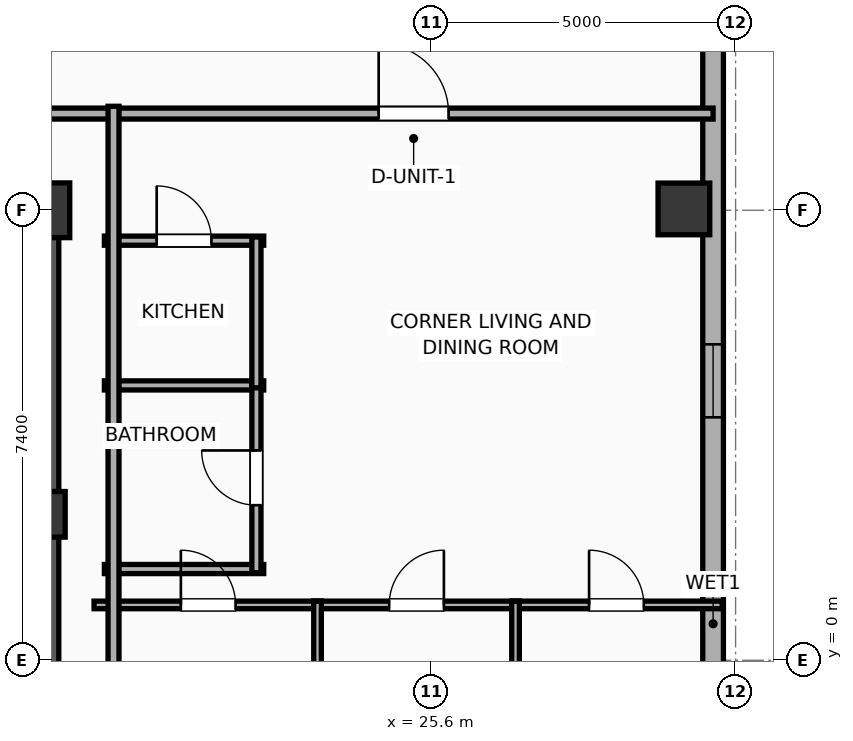
"""IFC4 building model, lengths in metres.
Left out: names, types, materials, properties, quantities, classifications, styles, units other than length and angle.
Written with IfcOpenShell. Run it as: python <this file> out.ifc"""

import sys

from ifc_helpers import new_model, si_unit, direction, frame, frame_2d, origin, origin_2d, place, context, subcontext, project, spatial, rectangle, hollow_rectangle, extrude, element, fill, save


model = new_model("IFC4")
c1 = context("Model", 3, precision=1e-05, world=origin(), true_north=direction((0.0, 1.0)))
c2 = subcontext(c1, "Body", "Model", "MODEL_VIEW")
j1 = project(units=[si_unit("LENGTHUNIT", "METRE"), si_unit("PLANEANGLEUNIT", "RADIAN")], contexts=[c1])
p1 = place(None, origin())
s1 = spatial("IfcSite", under=j1, at=p1, CompositionType="ELEMENT")
p2 = place(p1, origin())
s2 = spatial("IfcBuilding", under=s1, at=p2, CompositionType="ELEMENT")
p3 = place(p2, frame((0.0, 0.0, 247.0)))
s3 = spatial("IfcBuildingStorey", under=s2, at=p3, CompositionType="ELEMENT", Elevation=247.0)
p4 = place(p3, frame((19.2, 2.4, 0.0), z_axis=(0.0, 0.0, 1.0), x_axis=(1.0, 0.0, 0.0)))
e1 = element("IfcColumn", 1, at=p4, inside=s3, PredefinedType="COLUMN", context=c2, shape_type="SweptSolid", body=[
    extrude(rectangle(XDim=0.75, YDim=0.75, at=origin_2d()), origin(), (0.0, 0.0, 1.0), 3.9),
])
p5 = place(p3, frame((19.2, 7.4, 0.0), z_axis=(0.0, 0.0, 1.0), x_axis=(1.0, 0.0, 0.0)))
e2 = element("IfcColumn", 2, at=p5, inside=s3, PredefinedType="COLUMN", context=c2, shape_type="SweptSolid", body=[
    extrude(rectangle(XDim=0.9, YDim=0.9, at=origin_2d()), origin(), (0.0, 0.0, 1.0), 3.9),
])
p6 = place(p3, frame((12.175, 7.4, 0.0), z_axis=(0.0, 0.0, 1.0), x_axis=(1.0, 0.0, 0.0)))
e3 = element("IfcWall", 3, at=p6, inside=s3, PredefinedType="SHEAR", context=c2, shape_type="SweptSolid", body=[
    extrude(rectangle(XDim=7.25, YDim=0.45, at=frame_2d((3.625, 0.0))), origin(), (0.0, 0.0, 1.0), 3.65),
])
p7 = place(p3, frame((19.145, -7.4, 0.0), z_axis=(0.0, 0.0, 1.0), x_axis=(0.0, 1.0, 0.0)))
e4 = element("IfcWall", 4, at=p7, inside=s3, PredefinedType="SHEAR", context=c2, shape_type="SweptSolid", body=[
    extrude(rectangle(XDim=14.8, YDim=0.65, at=frame_2d((7.4, 0.0))), origin(), (0.0, 0.0, 1.0), 3.65),
])
p8 = place(p3, frame((29.75, 7.422, 0.0), z_axis=(0.0, 0.0, 1.0), x_axis=(1.0, 0.0, 0.0)))
e5 = element("IfcColumn", 5, at=p8, inside=s3, PredefinedType="COLUMN", context=c2, shape_type="SweptSolid", body=[
    extrude(hollow_rectangle(XDim=0.85, YDim=0.85, WallThickness=0.028, at=origin_2d()), origin(), (0.0, 0.0, 1.0), 3.9),
])
p9 = place(p3, frame((30.23, 16.583, 0.0), z_axis=(0.0, 0.0, 1.0), x_axis=(0.0, -1.0, 0.0)))
e6 = element("IfcWall", 6, at=p9, inside=s3, PredefinedType="ELEMENTEDWALL", context=c2, shape_type="SweptSolid", body=[
    extrude(rectangle(XDim=31.967, YDim=0.34, at=frame_2d((15.983, 0.0))), origin(), (0.0, 0.0, 1.0), 3.65),
])
p10 = place(p9, frame((11.388, 0.0, 0.75)))
e7 = element("IfcOpeningElement", 7, at=p10, cuts=e6, PredefinedType="OPENING", context=c2, shape_type="SweptSolid", body=[
    extrude(rectangle(XDim=1.2, YDim=2.05, at=frame_2d((0.6, 1.025))), frame((0.0, 0.18, 0.0), z_axis=(0.0, -1.0, 0.0), x_axis=(1.0, 0.0, 0.0)), (0.0, 0.0, 1.0), 0.36),
])
p11 = place(p9, frame((20.438, 0.0, 0.75)))
e8 = element("IfcOpeningElement", 8, at=p11, cuts=e6, PredefinedType="OPENING", context=c2, shape_type="SweptSolid", body=[
    extrude(rectangle(XDim=1.2, YDim=2.05, at=frame_2d((0.6, 1.025))), frame((0.0, 0.18, 0.0), z_axis=(0.0, -1.0, 0.0), x_axis=(1.0, 0.0, 0.0)), (0.0, 0.0, 1.0), 0.36),
])
p12 = place(p3, frame((9.88, 8.99, 0.0), z_axis=(0.0, 0.0, 1.0), x_axis=(1.0, 0.0, 0.0)))
e9 = element("IfcWall", 9, at=p12, inside=s3, PredefinedType="PARTITIONING", context=c2, shape_type="SweptSolid", body=[
    extrude(rectangle(XDim=20.35, YDim=0.18, at=frame_2d((10.175, 0.0))), origin(), (0.0, 0.0, 1.0), 3.65),
])
p13 = place(p12, frame((14.85, 0.0, 0.0)))
e10 = element("IfcOpeningElement", 10, at=p13, cuts=e9, PredefinedType="OPENING", context=c2, shape_type="SweptSolid", body=[
    extrude(rectangle(XDim=1.15, YDim=2.05, at=frame_2d((0.575, 1.025))), frame((0.0, 0.1, 0.0), z_axis=(0.0, -1.0, 0.0), x_axis=(1.0, 0.0, 0.0)), (0.0, 0.0, 1.0), 0.2),
])
p14 = place(p3, frame((20.22, 6.9, 0.0), z_axis=(0.0, 0.0, 1.0), x_axis=(1.0, 0.0, 0.0)))
e11 = element("IfcWall", 11, at=p14, inside=s3, PredefinedType="PLUMBINGWALL", context=c2, shape_type="SweptSolid", body=[
    extrude(rectangle(XDim=2.62, YDim=0.15, at=frame_2d((1.31, 0.0))), origin(), (0.0, 0.0, 1.0), 3.65),
])
p15 = place(p14, frame((0.86, 0.0, 0.0)))
e12 = element("IfcOpeningElement", 12, at=p15, cuts=e11, PredefinedType="OPENING", context=c2, shape_type="SweptSolid", body=[
    extrude(rectangle(XDim=0.9, YDim=2.05, at=frame_2d((0.45, 1.025))), frame((0.0, 0.085, 0.0), z_axis=(0.0, -1.0, 0.0), x_axis=(1.0, 0.0, 0.0)), (0.0, 0.0, 1.0), 0.17),
])
for number, where, z_axis, x_axis in (
    (13, (20.22, 4.52, 0.0), (0.0, 0.0, 1.0), (1.0, 0.0, 0.0)),
    (14, (20.22, 1.5, 0.0), (0.0, 0.0, 1.0), (1.0, 0.0, 0.0)),
):
    element("IfcWall", number, at=place(p3, frame(where, z_axis=z_axis, x_axis=x_axis)), inside=s3, PredefinedType="PLUMBINGWALL", context=c2, shape_type="SweptSolid", body=[
        extrude(rectangle(XDim=2.62, YDim=0.15, at=frame_2d((1.31, 0.0))), origin(), (0.0, 0.0, 1.0), 3.65),
    ])
p16 = place(p3, frame((22.72, 1.44, 0.0), z_axis=(0.0, 0.0, 1.0), x_axis=(0.0, 1.0, 0.0)))
e15 = element("IfcWall", 15, at=p16, inside=s3, PredefinedType="PLUMBINGWALL", context=c2, shape_type="SweptSolid", body=[
    extrude(rectangle(XDim=3.12, YDim=0.15, at=frame_2d((1.56, 0.0))), origin(), (0.0, 0.0, 1.0), 3.65),
])
p17 = place(p16, frame((1.11, 0.0, 0.0)))
e16 = element("IfcOpeningElement", 16, at=p17, cuts=e15, PredefinedType="OPENING", context=c2, shape_type="SweptSolid", body=[
    extrude(rectangle(XDim=0.9, YDim=2.05, at=frame_2d((0.45, 1.025))), frame((0.0, 0.085, 0.0), z_axis=(0.0, -1.0, 0.0), x_axis=(1.0, 0.0, 0.0)), (0.0, 0.0, 1.0), 0.17),
])
p18 = place(p3, frame((22.72, 4.48, 0.0), z_axis=(0.0, 0.0, 1.0), x_axis=(0.0, 1.0, 0.0)))
e17 = element("IfcWall", 17, at=p18, inside=s3, PredefinedType="PLUMBINGWALL", context=c2, shape_type="SweptSolid", body=[
    extrude(rectangle(XDim=2.48, YDim=0.15, at=frame_2d((1.24, 0.0))), origin(), (0.0, 0.0, 1.0), 3.65),
])
p19 = place(p3, frame((20.05, 0.91, 0.0), z_axis=(0.0, 0.0, 1.0), x_axis=(1.0, 0.0, 0.0)))
e18 = element("IfcWall", 18, at=p19, inside=s3, PredefinedType="PARTITIONING", context=c2, shape_type="SweptSolid", body=[
    extrude(rectangle(XDim=3.738, YDim=0.125, at=frame_2d((1.869, 0.0))), origin(), (0.0, 0.0, 1.0), 3.65),
])
p20 = place(p19, frame((1.427, 0.0, 0.0)))
e19 = element("IfcOpeningElement", 19, at=p20, cuts=e18, PredefinedType="OPENING", context=c2, shape_type="SweptSolid", body=[
    extrude(rectangle(XDim=0.9, YDim=2.05, at=frame_2d((0.45, 1.025))), frame((0.0, 0.073, 0.0), z_axis=(0.0, -1.0, 0.0), x_axis=(1.0, 0.0, 0.0)), (0.0, 0.0, 1.0), 0.145),
])
p21 = place(p3, frame((23.663, 0.91, 0.0), z_axis=(0.0, 0.0, 1.0), x_axis=(1.0, 0.0, 0.0)))
e20 = element("IfcWall", 20, at=p21, inside=s3, PredefinedType="PARTITIONING", context=c2, shape_type="SweptSolid", body=[
    extrude(rectangle(XDim=3.381, YDim=0.125, at=frame_2d((1.69, 0.0))), origin(), (0.0, 0.0, 1.0), 3.65),
])
p22 = place(p21, frame((1.24, 0.0, 0.0)))
e21 = element("IfcOpeningElement", 21, at=p22, cuts=e20, PredefinedType="OPENING", context=c2, shape_type="SweptSolid", body=[
    extrude(rectangle(XDim=0.9, YDim=2.05, at=frame_2d((0.45, 1.025))), frame((0.0, 0.073, 0.0), z_axis=(0.0, -1.0, 0.0), x_axis=(1.0, 0.0, 0.0)), (0.0, 0.0, 1.0), 0.145),
])
p23 = place(p3, frame((26.918, 0.91, 0.0), z_axis=(0.0, 0.0, 1.0), x_axis=(1.0, 0.0, 0.0)))
e22 = element("IfcWall", 22, at=p23, inside=s3, PredefinedType="PARTITIONING", context=c2, shape_type="SweptSolid", body=[
    extrude(rectangle(XDim=3.461, YDim=0.125, at=frame_2d((1.731, 0.0))), origin(), (0.0, 0.0, 1.0), 3.65),
])
p24 = place(p23, frame((1.272, 0.0, 0.0)))
e23 = element("IfcOpeningElement", 23, at=p24, cuts=e22, PredefinedType="OPENING", context=c2, shape_type="SweptSolid", body=[
    extrude(rectangle(XDim=0.9, YDim=2.05, at=frame_2d((0.45, 1.025))), frame((0.0, 0.073, 0.0), z_axis=(0.0, -1.0, 0.0), x_axis=(1.0, 0.0, 0.0)), (0.0, 0.0, 1.0), 0.145),
])
for number, where, z_axis, x_axis in (
    (24, (26.981, -9.31, 0.0), (0.0, 0.0, 1.0), (0.0, 1.0, 0.0)),
    (25, (23.725, -9.31, 0.0), (0.0, 0.0, 1.0), (0.0, 1.0, 0.0)),
):
    element("IfcWall", number, at=place(p3, frame(where, z_axis=z_axis, x_axis=x_axis)), inside=s3, PredefinedType="PARTITIONING", context=c2, shape_type="SweptSolid", body=[
        extrude(rectangle(XDim=10.28, YDim=0.125, at=frame_2d((5.14, 0.0))), origin(), (0.0, 0.0, 1.0), 3.65),
    ])
p25 = place(p3, frame((20.37, -9.11, 0.0), z_axis=(0.0, 0.0, 1.0), x_axis=(0.0, 1.0, 0.0)))
e26 = element("IfcWall", 26, at=p25, inside=s3, PredefinedType="PARTITIONING", context=c2, shape_type="SweptSolid", body=[
    extrude(rectangle(XDim=18.22, YDim=0.18, at=frame_2d((9.11, 0.0))), origin(), (0.0, 0.0, 1.0), 3.65),
])
p26 = place(p10, origin())
e27 = element("IfcWindow", 27, at=p26, inside=s3, PartitioningType="SINGLE_PANEL", PredefinedType="WINDOW", context=c2, shape_type="SweptSolid", body=[
    extrude(rectangle(XDim=1.2, YDim=2.05, at=frame_2d((0.6, 1.025))), frame((0.0, 0.03, 0.0), z_axis=(0.0, -1.0, 0.0), x_axis=(1.0, 0.0, 0.0)), (0.0, 0.0, 1.0), 0.06),
])
fill(e7, e27)
p27 = place(p13, origin())
e28 = element("IfcDoor", 28, at=p27, inside=s3, OperationType="SINGLE_SWING_LEFT", PredefinedType="DOOR", context=c2, shape_type="SweptSolid", body=[
    extrude(rectangle(XDim=1.15, YDim=2.05, at=frame_2d((0.575, 1.025))), frame((0.0, 0.025, 0.0), z_axis=(0.0, -1.0, 0.0), x_axis=(1.0, 0.0, 0.0)), (0.0, 0.0, 1.0), 0.05),
])
fill(e10, e28)
p28 = place(p15, origin())
e29 = element("IfcDoor", 29, at=p28, inside=s3, OperationType="SINGLE_SWING_LEFT", PredefinedType="DOOR", context=c2, shape_type="SweptSolid", body=[
    extrude(rectangle(XDim=0.9, YDim=2.05, at=frame_2d((0.45, 1.025))), frame((0.0, 0.025, 0.0), z_axis=(0.0, -1.0, 0.0), x_axis=(1.0, 0.0, 0.0)), (0.0, 0.0, 1.0), 0.05),
])
fill(e12, e29)
p29 = place(p17, origin())
e30 = element("IfcDoor", 30, at=p29, inside=s3, OperationType="SINGLE_SWING_RIGHT", PredefinedType="DOOR", context=c2, shape_type="SweptSolid", body=[
    extrude(rectangle(XDim=0.9, YDim=2.05, at=frame_2d((0.45, 1.025))), frame((0.0, 0.025, 0.0), z_axis=(0.0, -1.0, 0.0), x_axis=(1.0, 0.0, 0.0)), (0.0, 0.0, 1.0), 0.05),
])
fill(e16, e30)
p30 = place(p20, origin())
e31 = element("IfcDoor", 31, at=p30, inside=s3, OperationType="SINGLE_SWING_LEFT", PredefinedType="DOOR", context=c2, shape_type="SweptSolid", body=[
    extrude(rectangle(XDim=0.9, YDim=2.05, at=frame_2d((0.45, 1.025))), frame((0.0, 0.025, 0.0), z_axis=(0.0, -1.0, 0.0), x_axis=(1.0, 0.0, 0.0)), (0.0, 0.0, 1.0), 0.05),
])
fill(e19, e31)
p31 = place(p22, origin())
e32 = element("IfcDoor", 32, at=p31, inside=s3, OperationType="SINGLE_SWING_RIGHT", PredefinedType="DOOR", context=c2, shape_type="SweptSolid", body=[
    extrude(rectangle(XDim=0.9, YDim=2.05, at=frame_2d((0.45, 1.025))), frame((0.0, 0.025, 0.0), z_axis=(0.0, -1.0, 0.0), x_axis=(1.0, 0.0, 0.0)), (0.0, 0.0, 1.0), 0.05),
])
fill(e21, e32)
p32 = place(p24, origin())
e33 = element("IfcDoor", 33, at=p32, inside=s3, OperationType="SINGLE_SWING_LEFT", PredefinedType="DOOR", context=c2, shape_type="SweptSolid", body=[
    extrude(rectangle(XDim=0.9, YDim=2.05, at=frame_2d((0.45, 1.025))), frame((0.0, 0.025, 0.0), z_axis=(0.0, -1.0, 0.0), x_axis=(1.0, 0.0, 0.0)), (0.0, 0.0, 1.0), 0.05),
])
fill(e23, e33)
save(model, sys.argv[1])
